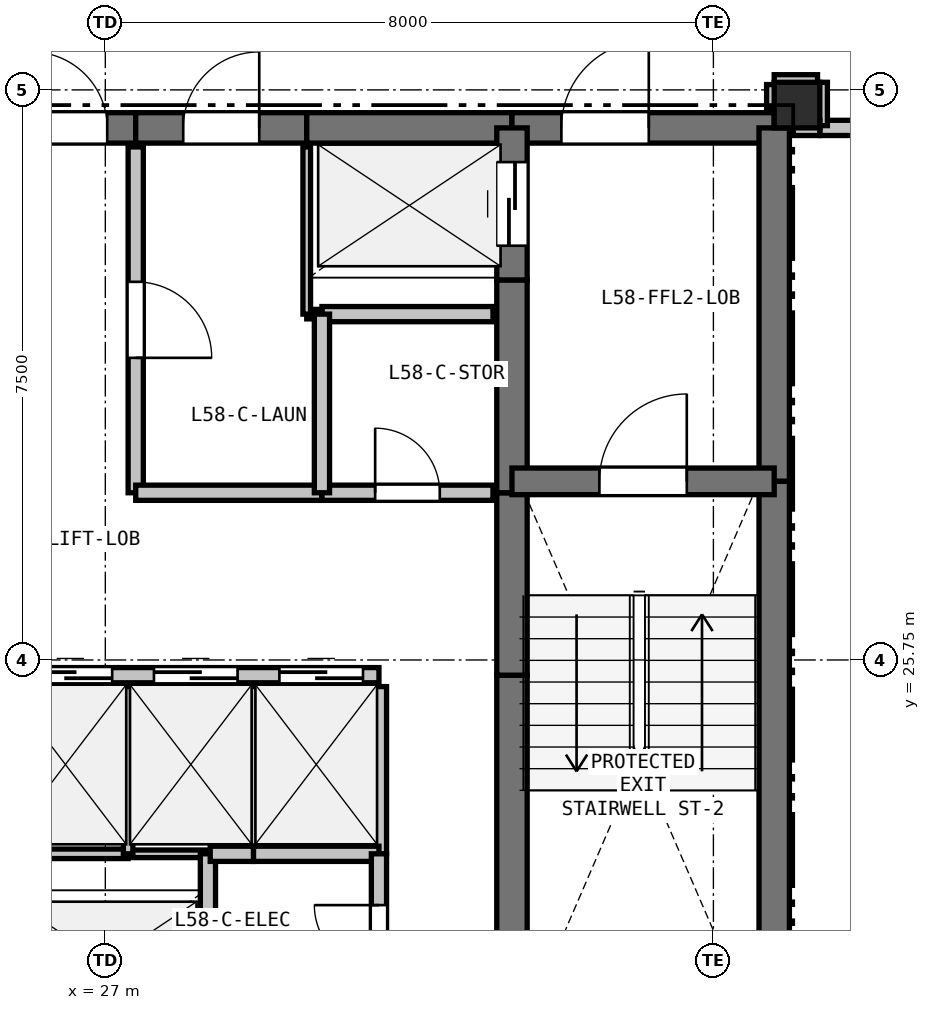
"""IFC4 building model, lengths in metres.
Left out: names, types, materials, properties, quantities, classifications, styles, units other than length and angle.
Written with IfcOpenShell. Run it as: python <this file> out.ifc"""

import sys

from ifc_helpers import new_model, si_unit, direction, frame, frame_2d, origin, origin_2d, place, context, subcontext, project, spatial, rectangle, extrude, element, fill, save


model = new_model("IFC4")
c1 = context("Model", 3, precision=1e-05, world=origin(), true_north=direction((0.0, 1.0)))
c2 = subcontext(c1, "Body", "Model", "MODEL_VIEW")
j1 = project(units=[si_unit("LENGTHUNIT", "METRE"), si_unit("PLANEANGLEUNIT", "RADIAN")], contexts=[c1])
p1 = place(None, origin())
s1 = spatial("IfcSite", under=j1, at=p1, CompositionType="ELEMENT")
p2 = place(p1, origin())
s2 = spatial("IfcBuilding", under=s1, at=p2, CompositionType="ELEMENT")
p3 = place(p2, frame((0.0, 0.0, 208.5)))
s3 = spatial("IfcBuildingStorey", under=s2, at=p3, CompositionType="ELEMENT", Elevation=208.5)
p4 = place(p3, frame((36.1, 33.05, 0.0), z_axis=(0.0, 0.0, 1.0), x_axis=(1.0, 0.0, 0.0)))
e1 = element("IfcColumn", 1, at=p4, inside=s3, PredefinedType="COLUMN", context=c2, shape_type="SweptSolid", body=[
    extrude(rectangle(XDim=0.6, YDim=0.6, at=origin_2d()), origin(), (0.0, 0.0, 1.0), 3.3),
])
p5 = place(p3, frame((25.65, 32.75, 0.0), z_axis=(0.0, 0.0, 1.0), x_axis=(1.0, 0.0, 0.0)))
e2 = element("IfcWall", 2, at=p5, inside=s3, PredefinedType="SHEAR", context=c2, shape_type="SweptSolid", body=[
    extrude(rectangle(XDim=1.75, YDim=0.4, at=frame_2d((0.875, 0.0))), origin(), (0.0, 0.0, 1.0), 3.07),
])
p6 = place(p5, frame((0.375, 0.0, 0.0)))
e3 = element("IfcOpeningElement", 3, at=p6, cuts=e2, PredefinedType="OPENING", context=c2, shape_type="SweptSolid", body=[
    extrude(rectangle(XDim=1.0, YDim=2.15, at=frame_2d((0.5, 1.075))), frame((0.0, 0.21, 0.0), z_axis=(0.0, -1.0, 0.0), x_axis=(1.0, 0.0, 0.0)), (0.0, 0.0, 1.0), 0.42),
])
p7 = place(p3, frame((27.4, 32.75, 0.0), z_axis=(0.0, 0.0, 1.0), x_axis=(1.0, 0.0, 0.0)))
e4 = element("IfcWall", 4, at=p7, inside=s3, PredefinedType="SHEAR", context=c2, shape_type="SweptSolid", body=[
    extrude(rectangle(XDim=2.25, YDim=0.4, at=frame_2d((1.125, 0.0))), origin(), (0.0, 0.0, 1.0), 3.07),
])
p8 = place(p7, frame((0.625, 0.0, 0.0)))
e5 = element("IfcOpeningElement", 5, at=p8, cuts=e4, PredefinedType="OPENING", context=c2, shape_type="SweptSolid", body=[
    extrude(rectangle(XDim=1.0, YDim=2.15, at=frame_2d((0.5, 1.075))), frame((0.0, 0.21, 0.0), z_axis=(0.0, -1.0, 0.0), x_axis=(1.0, 0.0, 0.0)), (0.0, 0.0, 1.0), 0.42),
])
p9 = place(p3, frame((29.65, 32.75, 0.0), z_axis=(0.0, 0.0, 1.0), x_axis=(1.0, 0.0, 0.0)))
e6 = element("IfcWall", 6, at=p9, inside=s3, PredefinedType="SHEAR", context=c2, shape_type="SweptSolid", body=[
    extrude(rectangle(XDim=2.7, YDim=0.4, at=frame_2d((1.35, 0.0))), origin(), (0.0, 0.0, 1.0), 3.07),
])
p10 = place(p3, frame((32.35, 32.75, 0.0), z_axis=(0.0, 0.0, 1.0), x_axis=(1.0, 0.0, 0.0)))
e7 = element("IfcWall", 7, at=p10, inside=s3, PredefinedType="SHEAR", context=c2, shape_type="SweptSolid", body=[
    extrude(rectangle(XDim=3.45, YDim=0.4, at=frame_2d((1.725, 0.0))), origin(), (0.0, 0.0, 1.0), 3.07),
])
p11 = place(p10, frame((0.65, 0.0, 0.0)))
e8 = element("IfcOpeningElement", 8, at=p11, cuts=e7, PredefinedType="OPENING", context=c2, shape_type="SweptSolid", body=[
    extrude(rectangle(XDim=1.15, YDim=2.15, at=frame_2d((0.575, 1.075))), frame((0.0, 0.21, 0.0), z_axis=(0.0, -1.0, 0.0), x_axis=(1.0, 0.0, 0.0)), (0.0, 0.0, 1.0), 0.42),
])
p12 = place(p3, frame((35.8, 32.75, 0.0), z_axis=(0.0, 0.0, 1.0), x_axis=(0.0, -1.0, 0.0)))
e9 = element("IfcWall", 9, at=p12, inside=s3, PredefinedType="SHEAR", context=c2, shape_type="SweptSolid", body=[
    extrude(rectangle(XDim=4.65, YDim=0.4, at=frame_2d((2.325, 0.0))), origin(), (0.0, 0.0, 1.0), 3.07),
])
p13 = place(p3, frame((35.8, 28.1, 0.0), z_axis=(0.0, 0.0, 1.0), x_axis=(0.0, -1.0, 0.0)))
e10 = element("IfcWall", 10, at=p13, inside=s3, PredefinedType="SHEAR", context=c2, shape_type="SweptSolid", body=[
    extrude(rectangle(XDim=7.35, YDim=0.4, at=frame_2d((3.675, 0.0))), origin(), (0.0, 0.0, 1.0), 3.07),
])
p14 = place(p3, frame((32.35, 20.75, 0.0), z_axis=(0.0, 0.0, 1.0), x_axis=(0.0, 1.0, 0.0)))
e11 = element("IfcWall", 11, at=p14, inside=s3, PredefinedType="SHEAR", context=c2, shape_type="SweptSolid", body=[
    extrude(rectangle(XDim=4.8, YDim=0.4, at=frame_2d((2.4, 0.0))), origin(), (0.0, 0.0, 1.0), 3.07),
])
p15 = place(p3, frame((32.35, 25.55, 0.0), z_axis=(0.0, 0.0, 1.0), x_axis=(0.0, 1.0, 0.0)))
e12 = element("IfcWall", 12, at=p15, inside=s3, PredefinedType="SHEAR", context=c2, shape_type="SweptSolid", body=[
    extrude(rectangle(XDim=2.4, YDim=0.4, at=frame_2d((1.2, 0.0))), origin(), (0.0, 0.0, 1.0), 3.07),
])
p16 = place(p3, frame((32.35, 27.95, 0.0), z_axis=(0.0, 0.0, 1.0), x_axis=(0.0, 1.0, 0.0)))
e13 = element("IfcWall", 13, at=p16, inside=s3, PredefinedType="SHEAR", context=c2, shape_type="SweptSolid", body=[
    extrude(rectangle(XDim=2.8, YDim=0.4, at=frame_2d((1.4, 0.0))), origin(), (0.0, 0.0, 1.0), 3.07),
])
p17 = place(p3, frame((32.35, 30.75, 0.0), z_axis=(0.0, 0.0, 1.0), x_axis=(0.0, 1.0, 0.0)))
e14 = element("IfcWall", 14, at=p17, inside=s3, PredefinedType="SHEAR", context=c2, shape_type="SweptSolid", body=[
    extrude(rectangle(XDim=2.0, YDim=0.4, at=frame_2d((1.0, 0.0))), origin(), (0.0, 0.0, 1.0), 3.07),
])
p18 = place(p17, frame((0.45, 0.0, 0.0)))
e15 = element("IfcOpeningElement", 15, at=p18, cuts=e14, PredefinedType="OPENING", context=c2, shape_type="SweptSolid", body=[
    extrude(rectangle(XDim=1.1, YDim=2.15, at=frame_2d((0.55, 1.075))), frame((0.0, 0.21, 0.0), z_axis=(0.0, -1.0, 0.0), x_axis=(1.0, 0.0, 0.0)), (0.0, 0.0, 1.0), 0.42),
])
p19 = place(p3, frame((32.35, 28.1, 0.0), z_axis=(0.0, 0.0, 1.0), x_axis=(1.0, 0.0, 0.0)))
e16 = element("IfcWall", 16, at=p19, inside=s3, PredefinedType="SHEAR", context=c2, shape_type="SweptSolid", body=[
    extrude(rectangle(XDim=3.45, YDim=0.35, at=frame_2d((1.725, 0.0))), origin(), (0.0, 0.0, 1.0), 3.07),
])
p20 = place(p19, frame((1.15, 0.0, 0.0)))
e17 = element("IfcOpeningElement", 17, at=p20, cuts=e16, PredefinedType="OPENING", context=c2, shape_type="SweptSolid", body=[
    extrude(rectangle(XDim=1.15, YDim=2.15, at=frame_2d((0.575, 1.075))), frame((0.0, 0.185, 0.0), z_axis=(0.0, -1.0, 0.0), x_axis=(1.0, 0.0, 0.0)), (0.0, 0.0, 1.0), 0.37),
])
p21 = place(p3, frame((25.65, 25.55, 0.0), z_axis=(0.0, 0.0, 1.0), x_axis=(1.0, 0.0, 0.0)))
e18 = element("IfcWall", 18, at=p21, inside=s3, PredefinedType="PARTITIONING", context=c2, shape_type="SweptSolid", body=[
    extrude(rectangle(XDim=4.95, YDim=0.2, at=frame_2d((2.475, 0.0))), origin(), (0.0, 0.0, 1.0), 3.07),
])
p22 = place(p21, frame((0.34, 0.0, 0.0)))
e19 = element("IfcOpeningElement", 19, at=p22, cuts=e18, PredefinedType="OPENING", context=c2, shape_type="SweptSolid", body=[
    extrude(rectangle(XDim=1.1, YDim=2.15, at=frame_2d((0.55, 1.075))), frame((0.0, 0.11, 0.0), z_axis=(0.0, -1.0, 0.0), x_axis=(1.0, 0.0, 0.0)), (0.0, 0.0, 1.0), 0.22),
])
p23 = place(p21, frame((1.99, 0.0, 0.0)))
e20 = element("IfcOpeningElement", 20, at=p23, cuts=e18, PredefinedType="OPENING", context=c2, shape_type="SweptSolid", body=[
    extrude(rectangle(XDim=1.1, YDim=2.15, at=frame_2d((0.55, 1.075))), frame((0.0, 0.11, 0.0), z_axis=(0.0, -1.0, 0.0), x_axis=(1.0, 0.0, 0.0)), (0.0, 0.0, 1.0), 0.22),
])
p24 = place(p21, frame((3.64, 0.0, 0.0)))
e21 = element("IfcOpeningElement", 21, at=p24, cuts=e18, PredefinedType="OPENING", context=c2, shape_type="SweptSolid", body=[
    extrude(rectangle(XDim=1.1, YDim=2.15, at=frame_2d((0.55, 1.075))), frame((0.0, 0.11, 0.0), z_axis=(0.0, -1.0, 0.0), x_axis=(1.0, 0.0, 0.0)), (0.0, 0.0, 1.0), 0.22),
])
p25 = place(p3, frame((25.9, 23.2, 0.0), z_axis=(0.0, 0.0, 1.0), x_axis=(1.0, 0.0, 0.0)))
e22 = element("IfcWall", 22, at=p25, inside=s3, PredefinedType="PARTITIONING", context=c2, shape_type="SweptSolid", body=[
    extrude(rectangle(XDim=1.4, YDim=0.125, at=frame_2d((0.7, 0.0))), origin(), (0.0, 0.0, 1.0), 3.07),
])
p26 = place(p3, frame((27.3, 23.2, 0.0), z_axis=(0.0, 0.0, 1.0), x_axis=(1.0, 0.0, 0.0)))
e23 = element("IfcWall", 23, at=p26, inside=s3, PredefinedType="PARTITIONING", context=c2, shape_type="SweptSolid", body=[
    extrude(rectangle(XDim=1.05, YDim=0.1, at=frame_2d((0.525, 0.0))), origin(), (0.0, 0.0, 1.0), 3.07),
])
p27 = place(p3, frame((28.35, 23.2, 0.0), z_axis=(0.0, 0.0, 1.0), x_axis=(0.0, -1.0, 0.0)))
e24 = element("IfcWall", 24, at=p27, inside=s3, PredefinedType="PARTITIONING", context=c2, shape_type="SweptSolid", body=[
    extrude(rectangle(XDim=2.2, YDim=0.2, at=frame_2d((1.1, 0.0))), origin(), (0.0, 0.0, 1.0), 3.07),
])
p28 = place(p3, frame((32.1, 30.3, 0.0), z_axis=(0.0, 0.0, 1.0), x_axis=(-1.0, 0.0, 0.0)))
e25 = element("IfcWall", 25, at=p28, inside=s3, PredefinedType="PARTITIONING", context=c2, shape_type="SweptSolid", body=[
    extrude(rectangle(XDim=2.25, YDim=0.2, at=frame_2d((1.125, 0.0))), origin(), (0.0, 0.0, 1.0), 3.07),
])
p29 = place(p3, frame((29.85, 30.3, 0.0), z_axis=(0.0, 0.0, 1.0), x_axis=(-1.0, 0.0, 0.0)))
e26 = element("IfcWall", 26, at=p29, inside=s3, PredefinedType="PARTITIONING", context=c2, shape_type="SweptSolid", body=[
    extrude(rectangle(XDim=0.2, YDim=0.125, at=frame_2d((0.1, 0.0))), origin(), (0.0, 0.0, 1.0), 3.07),
])
p30 = place(p3, frame((29.65, 30.3, 0.0), z_axis=(0.0, 0.0, 1.0), x_axis=(0.0, 1.0, 0.0)))
e27 = element("IfcWall", 27, at=p30, inside=s3, PredefinedType="PARTITIONING", context=c2, shape_type="SweptSolid", body=[
    extrude(rectangle(XDim=2.2, YDim=0.1, at=frame_2d((1.1, 0.0))), origin(), (0.0, 0.0, 1.0), 3.07),
])
p31 = place(p3, frame((27.3, 25.4, 0.0), z_axis=(0.0, 0.0, 1.0), x_axis=(0.0, -1.0, 0.0)))
e28 = element("IfcWall", 28, at=p31, inside=s3, PredefinedType="PARTITIONING", context=c2, shape_type="SweptSolid", body=[
    extrude(rectangle(XDim=2.2, YDim=0.125, at=frame_2d((1.1, 0.0))), origin(), (0.0, 0.0, 1.0), 3.07),
])
p32 = place(p3, frame((28.95, 25.4, 0.0), z_axis=(0.0, 0.0, 1.0), x_axis=(0.0, -1.0, 0.0)))
e29 = element("IfcWall", 29, at=p32, inside=s3, PredefinedType="PARTITIONING", context=c2, shape_type="SweptSolid", body=[
    extrude(rectangle(XDim=2.2, YDim=0.1, at=frame_2d((1.1, 0.0))), origin(), (0.0, 0.0, 1.0), 3.07),
])
p33 = place(p3, frame((28.95, 23.2, 0.0), z_axis=(0.0, 0.0, 1.0), x_axis=(-1.0, 0.0, 0.0)))
e30 = element("IfcWall", 30, at=p33, inside=s3, PredefinedType="PARTITIONING", context=c2, shape_type="SweptSolid", body=[
    extrude(rectangle(XDim=0.57, YDim=0.2, at=frame_2d((0.285, 0.0))), origin(), (0.0, 0.0, 1.0), 3.07),
])
p34 = place(p3, frame((30.6, 25.4, 0.0), z_axis=(0.0, 0.0, 1.0), x_axis=(0.0, -1.0, 0.0)))
e31 = element("IfcWall", 31, at=p34, inside=s3, PredefinedType="PARTITIONING", context=c2, shape_type="SweptSolid", body=[
    extrude(rectangle(XDim=2.2, YDim=0.2, at=frame_2d((1.1, 0.0))), origin(), (0.0, 0.0, 1.0), 3.07),
])
p35 = place(p3, frame((30.6, 23.2, 0.0), z_axis=(0.0, 0.0, 1.0), x_axis=(-1.0, 0.0, 0.0)))
e32 = element("IfcWall", 32, at=p35, inside=s3, PredefinedType="PARTITIONING", context=c2, shape_type="SweptSolid", body=[
    extrude(rectangle(XDim=1.65, YDim=0.2, at=frame_2d((0.825, 0.0))), origin(), (0.0, 0.0, 1.0), 3.07),
])
p36 = place(p3, frame((30.6, 21.0, 0.0), z_axis=(0.0, 0.0, 1.0), x_axis=(0.0, 1.0, 0.0)))
e33 = element("IfcWall", 33, at=p36, inside=s3, PredefinedType="PARTITIONING", context=c2, shape_type="SweptSolid", body=[
    extrude(rectangle(XDim=2.2, YDim=0.2, at=frame_2d((1.1, 0.0))), origin(), (0.0, 0.0, 1.0), 3.07),
])
p37 = place(p36, frame((0.675, 0.0, 0.0)))
e34 = element("IfcOpeningElement", 34, at=p37, cuts=e33, PredefinedType="OPENING", context=c2, shape_type="SweptSolid", body=[
    extrude(rectangle(XDim=0.85, YDim=2.1, at=frame_2d((0.425, 1.05))), frame((0.0, 0.11, 0.0), z_axis=(0.0, -1.0, 0.0), x_axis=(1.0, 0.0, 0.0)), (0.0, 0.0, 1.0), 0.22),
])
p38 = place(p3, frame((27.4, 32.5, 0.0), z_axis=(0.0, 0.0, 1.0), x_axis=(0.0, -1.0, 0.0)))
e35 = element("IfcWall", 35, at=p38, inside=s3, PredefinedType="PARTITIONING", context=c2, shape_type="SweptSolid", body=[
    extrude(rectangle(XDim=4.55, YDim=0.2, at=frame_2d((2.275, 0.0))), origin(), (0.0, 0.0, 1.0), 3.07),
])
p39 = place(p38, frame((1.775, 0.0, 0.0)))
e36 = element("IfcOpeningElement", 36, at=p39, cuts=e35, PredefinedType="OPENING", context=c2, shape_type="SweptSolid", body=[
    extrude(rectangle(XDim=1.0, YDim=2.15, at=frame_2d((0.5, 1.075))), frame((0.0, 0.11, 0.0), z_axis=(0.0, -1.0, 0.0), x_axis=(1.0, 0.0, 0.0)), (0.0, 0.0, 1.0), 0.22),
])
p40 = place(p3, frame((27.4, 27.95, 0.0), z_axis=(0.0, 0.0, 1.0), x_axis=(1.0, 0.0, 0.0)))
e37 = element("IfcWall", 37, at=p40, inside=s3, PredefinedType="PARTITIONING", context=c2, shape_type="SweptSolid", body=[
    extrude(rectangle(XDim=2.45, YDim=0.2, at=frame_2d((1.225, 0.0))), origin(), (0.0, 0.0, 1.0), 3.07),
])
p41 = place(p3, frame((29.85, 27.95, 0.0), z_axis=(0.0, 0.0, 1.0), x_axis=(1.0, 0.0, 0.0)))
e38 = element("IfcWall", 38, at=p41, inside=s3, PredefinedType="PARTITIONING", context=c2, shape_type="SweptSolid", body=[
    extrude(rectangle(XDim=2.25, YDim=0.2, at=frame_2d((1.125, 0.0))), origin(), (0.0, 0.0, 1.0), 3.07),
])
p42 = place(p41, frame((0.7, 0.0, 0.0)))
e39 = element("IfcOpeningElement", 39, at=p42, cuts=e38, PredefinedType="OPENING", context=c2, shape_type="SweptSolid", body=[
    extrude(rectangle(XDim=0.85, YDim=2.1, at=frame_2d((0.425, 1.05))), frame((0.0, 0.11, 0.0), z_axis=(0.0, -1.0, 0.0), x_axis=(1.0, 0.0, 0.0)), (0.0, 0.0, 1.0), 0.22),
])
p43 = place(p3, frame((39.2, 32.75, 0.0), z_axis=(0.0, 0.0, 1.0), x_axis=(-1.0, 0.0, 0.0)))
e40 = element("IfcWall", 40, at=p43, inside=s3, PredefinedType="PARTITIONING", context=c2, shape_type="SweptSolid", body=[
    extrude(rectangle(XDim=2.8, YDim=0.2, at=frame_2d((1.4, 0.0))), origin(), (0.0, 0.0, 1.0), 3.07),
])
p44 = place(p43, frame((0.975, 0.0, 0.0)))
e41 = element("IfcOpeningElement", 41, at=p44, cuts=e40, PredefinedType="OPENING", context=c2, shape_type="SweptSolid", body=[
    extrude(rectangle(XDim=0.85, YDim=2.1, at=frame_2d((0.425, 1.05))), frame((0.0, 0.11, 0.0), z_axis=(0.0, -1.0, 0.0), x_axis=(1.0, 0.0, 0.0)), (0.0, 0.0, 1.0), 0.22),
])
for number, where, z_axis, x_axis in (
    (42, (36.4, 32.78, 0.0), (0.0, 0.0, 1.0), (0.0, 1.0, 0.0)),
    (43, (36.37, 33.35, 0.0), (0.0, 0.0, 1.0), (-1.0, 0.0, 0.0)),
):
    element("IfcWall", number, at=place(p3, frame(where, z_axis=z_axis, x_axis=x_axis)), inside=s3, PredefinedType="PARTITIONING", context=c2, shape_type="SweptSolid", body=[
        extrude(rectangle(XDim=0.57, YDim=0.2, at=frame_2d((0.285, 0.0))), origin(), (0.0, 0.0, 1.0), 2.518),
    ])
p45 = place(p3, frame((35.8, 33.32, 0.0), z_axis=(0.0, 0.0, 1.0), x_axis=(0.0, -1.0, 0.0)))
e44 = element("IfcWall", 44, at=p45, inside=s3, PredefinedType="PARTITIONING", context=c2, shape_type="SweptSolid", body=[
    extrude(rectangle(XDim=0.32, YDim=0.2, at=frame_2d((0.16, 0.0))), origin(), (0.0, 0.0, 1.0), 2.595),
])
p46 = place(p3, frame((29.85, 30.3, 0.0), z_axis=(0.0, 0.0, 1.0), x_axis=(0.0, -1.0, 0.0)))
e45 = element("IfcWall", 45, at=p46, inside=s3, PredefinedType="PARTITIONING", context=c2, shape_type="SweptSolid", body=[
    extrude(rectangle(XDim=2.35, YDim=0.2, at=frame_2d((1.175, 0.0))), origin(), (0.0, 0.0, 1.0), 3.07),
])
p47 = place(p3, frame((36.05, 32.75, 0.0), z_axis=(0.0, 0.0, 1.0), x_axis=(1.0, 0.0, 0.0)))
e46 = element("IfcWall", 46, at=p47, inside=s3, PredefinedType="PARTITIONING", context=c2, shape_type="SweptSolid", body=[
    extrude(rectangle(XDim=0.35, YDim=0.2, at=frame_2d((0.175, 0.0))), origin(), (0.0, 0.0, 1.0), 2.595),
])
p48 = place(p22, origin())
e47 = element("IfcDoor", 47, at=p48, inside=s3, OperationType="SLIDING_TO_LEFT", PredefinedType="DOOR", context=c2, shape_type="SweptSolid", body=[
    extrude(rectangle(XDim=1.1, YDim=2.15, at=frame_2d((0.55, 1.075))), frame((0.0, 0.025, 0.0), z_axis=(0.0, -1.0, 0.0), x_axis=(1.0, 0.0, 0.0)), (0.0, 0.0, 1.0), 0.05),
])
fill(e19, e47)
p49 = place(p23, origin())
e48 = element("IfcDoor", 48, at=p49, inside=s3, OperationType="SLIDING_TO_LEFT", PredefinedType="DOOR", context=c2, shape_type="SweptSolid", body=[
    extrude(rectangle(XDim=1.1, YDim=2.15, at=frame_2d((0.55, 1.075))), frame((0.0, 0.025, 0.0), z_axis=(0.0, -1.0, 0.0), x_axis=(1.0, 0.0, 0.0)), (0.0, 0.0, 1.0), 0.05),
])
fill(e20, e48)
p50 = place(p24, origin())
e49 = element("IfcDoor", 49, at=p50, inside=s3, OperationType="SLIDING_TO_LEFT", PredefinedType="DOOR", context=c2, shape_type="SweptSolid", body=[
    extrude(rectangle(XDim=1.1, YDim=2.15, at=frame_2d((0.55, 1.075))), frame((0.0, 0.025, 0.0), z_axis=(0.0, -1.0, 0.0), x_axis=(1.0, 0.0, 0.0)), (0.0, 0.0, 1.0), 0.05),
])
fill(e21, e49)
p51 = place(p6, origin())
e50 = element("IfcDoor", 50, at=p51, inside=s3, OperationType="SINGLE_SWING_LEFT", PredefinedType="DOOR", context=c2, shape_type="SweptSolid", body=[
    extrude(rectangle(XDim=1.0, YDim=2.15, at=frame_2d((0.5, 1.075))), frame((0.0, 0.025, 0.0), z_axis=(0.0, -1.0, 0.0), x_axis=(1.0, 0.0, 0.0)), (0.0, 0.0, 1.0), 0.05),
])
fill(e3, e50)
p52 = place(p18, origin())
e51 = element("IfcDoor", 51, at=p52, inside=s3, OperationType="SLIDING_TO_LEFT", PredefinedType="DOOR", context=c2, shape_type="SweptSolid", body=[
    extrude(rectangle(XDim=1.1, YDim=2.15, at=frame_2d((0.55, 1.075))), frame((0.0, 0.025, 0.0), z_axis=(0.0, -1.0, 0.0), x_axis=(1.0, 0.0, 0.0)), (0.0, 0.0, 1.0), 0.05),
])
fill(e15, e51)
p53 = place(p20, origin())
e52 = element("IfcDoor", 52, at=p53, inside=s3, OperationType="SINGLE_SWING_RIGHT", PredefinedType="DOOR", context=c2, shape_type="SweptSolid", body=[
    extrude(rectangle(XDim=1.15, YDim=2.15, at=frame_2d((0.575, 1.075))), frame((0.0, 0.025, 0.0), z_axis=(0.0, -1.0, 0.0), x_axis=(1.0, 0.0, 0.0)), (0.0, 0.0, 1.0), 0.05),
])
fill(e17, e52)
p54 = place(p11, origin())
e53 = element("IfcDoor", 53, at=p54, inside=s3, OperationType="SINGLE_SWING_RIGHT", PredefinedType="DOOR", context=c2, shape_type="SweptSolid", body=[
    extrude(rectangle(XDim=1.15, YDim=2.15, at=frame_2d((0.575, 1.075))), frame((0.0, 0.025, 0.0), z_axis=(0.0, -1.0, 0.0), x_axis=(1.0, 0.0, 0.0)), (0.0, 0.0, 1.0), 0.05),
])
fill(e8, e53)
p55 = place(p39, origin())
e54 = element("IfcDoor", 54, at=p55, inside=s3, OperationType="SINGLE_SWING_RIGHT", PredefinedType="DOOR", context=c2, shape_type="SweptSolid", body=[
    extrude(rectangle(XDim=1.0, YDim=2.15, at=frame_2d((0.5, 1.075))), frame((0.0, 0.025, 0.0), z_axis=(0.0, -1.0, 0.0), x_axis=(1.0, 0.0, 0.0)), (0.0, 0.0, 1.0), 0.05),
])
fill(e36, e54)
p56 = place(p42, origin())
e55 = element("IfcDoor", 55, at=p56, inside=s3, OperationType="SINGLE_SWING_LEFT", PredefinedType="DOOR", context=c2, shape_type="SweptSolid", body=[
    extrude(rectangle(XDim=0.85, YDim=2.1, at=frame_2d((0.425, 1.05))), frame((0.0, 0.025, 0.0), z_axis=(0.0, -1.0, 0.0), x_axis=(1.0, 0.0, 0.0)), (0.0, 0.0, 1.0), 0.05),
])
fill(e39, e55)
p57 = place(p37, origin())
e56 = element("IfcDoor", 56, at=p57, inside=s3, OperationType="SINGLE_SWING_RIGHT", PredefinedType="DOOR", context=c2, shape_type="SweptSolid", body=[
    extrude(rectangle(XDim=0.85, YDim=2.1, at=frame_2d((0.425, 1.05))), frame((0.0, 0.025, 0.0), z_axis=(0.0, -1.0, 0.0), x_axis=(1.0, 0.0, 0.0)), (0.0, 0.0, 1.0), 0.05),
])
fill(e34, e56)
p58 = place(p8, origin())
e57 = element("IfcDoor", 57, at=p58, inside=s3, OperationType="SINGLE_SWING_RIGHT", PredefinedType="DOOR", context=c2, shape_type="SweptSolid", body=[
    extrude(rectangle(XDim=1.0, YDim=2.15, at=frame_2d((0.5, 1.075))), frame((0.0, 0.025, 0.0), z_axis=(0.0, -1.0, 0.0), x_axis=(1.0, 0.0, 0.0)), (0.0, 0.0, 1.0), 0.05),
])
fill(e5, e57)
save(model, sys.argv[1])
